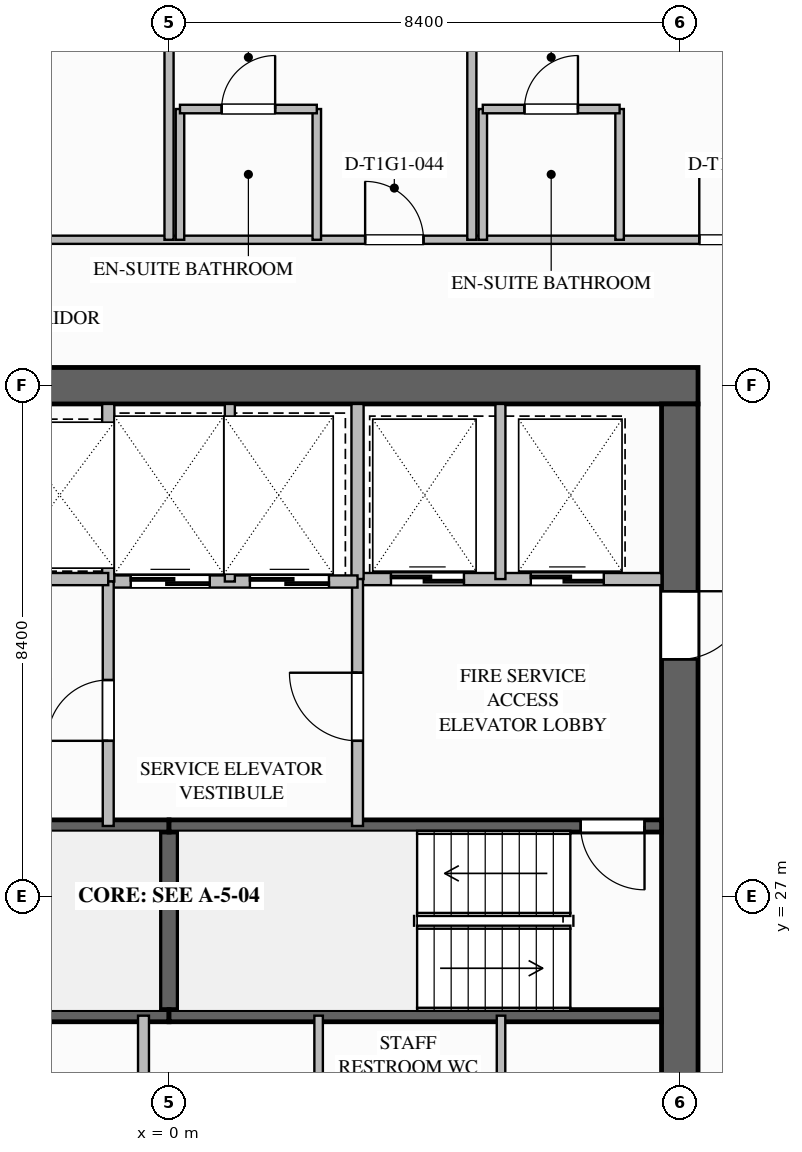
"""IFC4 building model, lengths in metres.
Left out: names, types, materials, properties, quantities, classifications, styles, units other than length and angle.
Written with IfcOpenShell. Run it as: python <this file> out.ifc"""

import sys

from ifc_helpers import new_model, si_unit, direction, frame, frame_2d, origin, place, context, subcontext, project, spatial, rectangle, extrude, element, fill, save


model = new_model("IFC4")
c1 = context("Model", 3, precision=1e-05, world=origin(), true_north=direction((0.0, 1.0)))
c2 = subcontext(c1, "Body", "Model", "MODEL_VIEW")
j1 = project(units=[si_unit("LENGTHUNIT", "METRE"), si_unit("PLANEANGLEUNIT", "RADIAN")], contexts=[c1])
p1 = place(None, origin())
s1 = spatial("IfcSite", under=j1, at=p1, CompositionType="ELEMENT")
p2 = place(p1, origin())
s2 = spatial("IfcBuilding", under=s1, at=p2, CompositionType="ELEMENT")
p3 = place(p2, frame((0.0, 0.0, 33.2)))
s3 = spatial("IfcBuildingStorey", under=s2, at=p3, CompositionType="ELEMENT", Elevation=33.2)
p4 = place(p3, frame((-8.7, 35.4, 0.0), z_axis=(0.0, 0.0, 1.0), x_axis=(1.0, 0.0, 0.0)))
e1 = element("IfcWall", 1, at=p4, inside=s3, PredefinedType="SHEAR", context=c2, shape_type="SweptSolid", body=[
    extrude(rectangle(XDim=17.4, YDim=0.6, at=frame_2d((8.7, 0.0))), origin(), (0.0, 0.0, 1.0), 3.5),
])
p5 = place(p3, frame((8.4, 35.1, 0.0), z_axis=(0.0, 0.0, 1.0), x_axis=(0.0, -1.0, 0.0)))
e2 = element("IfcWall", 2, at=p5, inside=s3, PredefinedType="SHEAR", context=c2, shape_type="SweptSolid", body=[
    extrude(rectangle(XDim=16.2, YDim=0.6, at=frame_2d((8.1, 0.0))), origin(), (0.0, 0.0, 1.0), 3.5),
])
p6 = place(p5, frame((3.08, 0.0, 0.0)))
e3 = element("IfcOpeningElement", 3, at=p6, cuts=e2, PredefinedType="OPENING", context=c2, shape_type="SweptSolid", body=[
    extrude(rectangle(XDim=1.12, YDim=2.1, at=frame_2d((0.56, 1.05))), frame((0.0, 0.31, 0.0), z_axis=(0.0, -1.0, 0.0), x_axis=(1.0, 0.0, 0.0)), (0.0, 0.0, 1.0), 0.62),
])
p7 = place(p3, frame((0.0, 25.04, 0.0), z_axis=(0.0, 0.0, 1.0), x_axis=(0.0, 1.0, 0.0)))
e4 = element("IfcWall", 4, at=p7, inside=s3, PredefinedType="SOLIDWALL", context=c2, shape_type="SweptSolid", body=[
    extrude(rectangle(XDim=3.12, YDim=0.3, at=frame_2d((1.56, 0.0))), origin(), (0.0, 0.0, 1.0), 3.24),
])
p8 = place(p3, frame((-8.1, 25.04, 0.0), z_axis=(0.0, 0.0, 1.0), x_axis=(1.0, 0.0, 0.0)))
e5 = element("IfcWall", 5, at=p8, inside=s3, PredefinedType="SOLIDWALL", context=c2, shape_type="SweptSolid", body=[
    extrude(rectangle(XDim=8.1, YDim=0.2, at=frame_2d((4.05, 0.0))), origin(), (0.0, 0.0, 1.0), 3.24),
])
p9 = place(p8, frame((0.28, 0.0, 0.0)))
e6 = element("IfcOpeningElement", 6, at=p9, cuts=e5, PredefinedType="OPENING", context=c2, shape_type="SweptSolid", body=[
    extrude(rectangle(XDim=1.05, YDim=2.1, at=frame_2d((0.525, 1.05))), frame((0.0, 0.11, 0.0), z_axis=(0.0, -1.0, 0.0), x_axis=(1.0, 0.0, 0.0)), (0.0, 0.0, 1.0), 0.22),
])
for number, where, z_axis, x_axis in (
    (7, (-8.1, 28.16, 0.0), (0.0, 0.0, 1.0), (1.0, 0.0, 0.0)),
    (8, (0.0, 25.04, 0.0), (0.0, 0.0, 1.0), (1.0, 0.0, 0.0)),
):
    element("IfcWall", number, at=place(p3, frame(where, z_axis=z_axis, x_axis=x_axis)), inside=s3, PredefinedType="SOLIDWALL", context=c2, shape_type="SweptSolid", body=[
        extrude(rectangle(XDim=8.1, YDim=0.2, at=frame_2d((4.05, 0.0))), origin(), (0.0, 0.0, 1.0), 3.24),
    ])
p10 = place(p3, frame((8.1, 28.16, 0.0), z_axis=(0.0, 0.0, 1.0), x_axis=(-1.0, 0.0, 0.0)))
e9 = element("IfcWall", 9, at=p10, inside=s3, PredefinedType="SOLIDWALL", context=c2, shape_type="SweptSolid", body=[
    extrude(rectangle(XDim=8.1, YDim=0.2, at=frame_2d((4.05, 0.0))), origin(), (0.0, 0.0, 1.0), 3.24),
])
p11 = place(p10, frame((0.28, 0.0, 0.0)))
e10 = element("IfcOpeningElement", 10, at=p11, cuts=e9, PredefinedType="OPENING", context=c2, shape_type="SweptSolid", body=[
    extrude(rectangle(XDim=1.05, YDim=2.1, at=frame_2d((0.525, 1.05))), frame((0.0, 0.11, 0.0), z_axis=(0.0, -1.0, 0.0), x_axis=(1.0, 0.0, 0.0)), (0.0, 0.0, 1.0), 0.22),
])
p12 = place(p3, frame((3.1, 32.22, 0.0), z_axis=(0.0, 0.0, 1.0), x_axis=(1.0, 0.0, 0.0)))
e11 = element("IfcWall", 11, at=p12, inside=s3, PredefinedType="SOLIDWALL", context=c2, shape_type="SweptSolid", body=[
    extrude(rectangle(XDim=5.0, YDim=0.2, at=frame_2d((2.5, 0.0))), origin(), (0.0, 0.0, 1.0), 3.24),
])
p13 = place(p12, frame((0.55, 0.0, 0.0)))
e12 = element("IfcOpeningElement", 12, at=p13, cuts=e11, PredefinedType="OPENING", context=c2, shape_type="SweptSolid", body=[
    extrude(rectangle(XDim=1.2, YDim=2.2, at=frame_2d((0.6, 1.1))), frame((0.0, 0.11, 0.0), z_axis=(0.0, -1.0, 0.0), x_axis=(1.0, 0.0, 0.0)), (0.0, 0.0, 1.0), 0.22),
])
p14 = place(p12, frame((2.85, 0.0, 0.0)))
e13 = element("IfcOpeningElement", 13, at=p14, cuts=e11, PredefinedType="OPENING", context=c2, shape_type="SweptSolid", body=[
    extrude(rectangle(XDim=1.2, YDim=2.2, at=frame_2d((0.6, 1.1))), frame((0.0, 0.11, 0.0), z_axis=(0.0, -1.0, 0.0), x_axis=(1.0, 0.0, 0.0)), (0.0, 0.0, 1.0), 0.22),
])
p15 = place(p3, frame((3.1, 32.22, 0.0), z_axis=(0.0, 0.0, 1.0), x_axis=(0.0, 1.0, 0.0)))
e14 = element("IfcWall", 14, at=p15, inside=s3, PredefinedType="SOLIDWALL", context=c2, shape_type="SweptSolid", body=[
    extrude(rectangle(XDim=2.88, YDim=0.2, at=frame_2d((1.44, 0.0))), origin(), (0.0, 0.0, 1.0), 3.24),
])
p16 = place(p3, frame((5.45, 32.22, 0.0), z_axis=(0.0, 0.0, 1.0), x_axis=(0.0, 1.0, 0.0)))
e15 = element("IfcWall", 15, at=p16, inside=s3, PredefinedType="PARTITIONING", context=c2, shape_type="SweptSolid", body=[
    extrude(rectangle(XDim=2.88, YDim=0.165, at=frame_2d((1.44, 0.0))), origin(), (0.0, 0.0, 1.0), 3.24),
])
p17 = place(p3, frame((3.1, 28.16, 0.0), z_axis=(0.0, 0.0, 1.0), x_axis=(0.0, 1.0, 0.0)))
e16 = element("IfcWall", 16, at=p17, inside=s3, PredefinedType="SOLIDWALL", context=c2, shape_type="SweptSolid", body=[
    extrude(rectangle(XDim=4.06, YDim=0.18, at=frame_2d((2.03, 0.0))), origin(), (0.0, 0.0, 1.0), 3.24),
])
p18 = place(p17, frame((1.4, 0.0, 0.0)))
e17 = element("IfcOpeningElement", 17, at=p18, cuts=e16, PredefinedType="OPENING", context=c2, shape_type="SweptSolid", body=[
    extrude(rectangle(XDim=1.12, YDim=2.1, at=frame_2d((0.56, 1.05))), frame((0.0, 0.1, 0.0), z_axis=(0.0, -1.0, 0.0), x_axis=(1.0, 0.0, 0.0)), (0.0, 0.0, 1.0), 0.2),
])
p19 = place(p3, frame((-1.0, 32.18, 0.0), z_axis=(0.0, 0.0, 1.0), x_axis=(1.0, 0.0, 0.0)))
e18 = element("IfcWall", 18, at=p19, inside=s3, PredefinedType="SOLIDWALL", context=c2, shape_type="SweptSolid", body=[
    extrude(rectangle(XDim=4.1, YDim=0.2, at=frame_2d((2.05, 0.0))), origin(), (0.0, 0.0, 1.0), 3.24),
])
p20 = place(p19, frame((0.37, 0.0, 0.0)))
e19 = element("IfcOpeningElement", 19, at=p20, cuts=e18, PredefinedType="OPENING", context=c2, shape_type="SweptSolid", body=[
    extrude(rectangle(XDim=1.3, YDim=2.2, at=frame_2d((0.65, 1.1))), frame((0.0, 0.11, 0.0), z_axis=(0.0, -1.0, 0.0), x_axis=(1.0, 0.0, 0.0)), (0.0, 0.0, 1.0), 0.22),
])
p21 = place(p19, frame((2.33, 0.0, 0.0)))
e20 = element("IfcOpeningElement", 20, at=p21, cuts=e18, PredefinedType="OPENING", context=c2, shape_type="SweptSolid", body=[
    extrude(rectangle(XDim=1.3, YDim=2.2, at=frame_2d((0.65, 1.1))), frame((0.0, 0.11, 0.0), z_axis=(0.0, -1.0, 0.0), x_axis=(1.0, 0.0, 0.0)), (0.0, 0.0, 1.0), 0.22),
])
p22 = place(p3, frame((-1.0, 32.18, 0.0), z_axis=(0.0, 0.0, 1.0), x_axis=(0.0, 1.0, 0.0)))
e21 = element("IfcWall", 21, at=p22, inside=s3, PredefinedType="SOLIDWALL", context=c2, shape_type="SweptSolid", body=[
    extrude(rectangle(XDim=2.92, YDim=0.2, at=frame_2d((1.46, 0.0))), origin(), (0.0, 0.0, 1.0), 3.24),
])
p23 = place(p3, frame((1.0, 32.18, 0.0), z_axis=(0.0, 0.0, 1.0), x_axis=(0.0, 1.0, 0.0)))
e22 = element("IfcWall", 22, at=p23, inside=s3, PredefinedType="PARTITIONING", context=c2, shape_type="SweptSolid", body=[
    extrude(rectangle(XDim=2.92, YDim=0.165, at=frame_2d((1.46, 0.0))), origin(), (0.0, 0.0, 1.0), 3.24),
])
p24 = place(p3, frame((-1.0, 28.16, 0.0), z_axis=(0.0, 0.0, 1.0), x_axis=(0.0, 1.0, 0.0)))
e23 = element("IfcWall", 23, at=p24, inside=s3, PredefinedType="SOLIDWALL", context=c2, shape_type="SweptSolid", body=[
    extrude(rectangle(XDim=4.02, YDim=0.18, at=frame_2d((2.01, 0.0))), origin(), (0.0, 0.0, 1.0), 3.24),
])
p25 = place(p24, frame((1.4, 0.0, 0.0)))
e24 = element("IfcOpeningElement", 24, at=p25, cuts=e23, PredefinedType="OPENING", context=c2, shape_type="SweptSolid", body=[
    extrude(rectangle(XDim=1.0, YDim=2.1, at=frame_2d((0.5, 1.05))), frame((0.0, 0.1, 0.0), z_axis=(0.0, -1.0, 0.0), x_axis=(1.0, 0.0, 0.0)), (0.0, 0.0, 1.0), 0.2),
])
p26 = place(p3, frame((-8.1, 32.22, 0.0), z_axis=(0.0, 0.0, 1.0), x_axis=(1.0, 0.0, 0.0)))
e25 = element("IfcWall", 25, at=p26, inside=s3, PredefinedType="SOLIDWALL", context=c2, shape_type="SweptSolid", body=[
    extrude(rectangle(XDim=7.1, YDim=0.2, at=frame_2d((3.55, 0.0))), origin(), (0.0, 0.0, 1.0), 3.24),
])
p27 = place(p3, frame((-0.42, 21.78, 0.0), z_axis=(0.0, 0.0, 1.0), x_axis=(0.0, 1.0, 0.0)))
e26 = element("IfcWall", 26, at=p27, inside=s3, PredefinedType="SOLIDWALL", context=c2, shape_type="SweptSolid", body=[
    extrude(rectangle(XDim=3.26, YDim=0.18, at=frame_2d((1.63, 0.0))), origin(), (0.0, 0.0, 1.0), 3.24),
])
p28 = place(p27, frame((1.1, 0.0, 0.0)))
e27 = element("IfcOpeningElement", 27, at=p28, cuts=e26, PredefinedType="OPENING", context=c2, shape_type="SweptSolid", body=[
    extrude(rectangle(XDim=1.0, YDim=2.1, at=frame_2d((0.5, 1.05))), frame((0.0, 0.1, 0.0), z_axis=(0.0, -1.0, 0.0), x_axis=(1.0, 0.0, 0.0)), (0.0, 0.0, 1.0), 0.2),
])
p29 = place(p3, frame((2.46, 21.78, 0.0), z_axis=(0.0, 0.0, 1.0), x_axis=(0.0, 1.0, 0.0)))
e28 = element("IfcWall", 28, at=p29, inside=s3, PredefinedType="PLUMBINGWALL", context=c2, shape_type="SweptSolid", body=[
    extrude(rectangle(XDim=3.26, YDim=0.14, at=frame_2d((1.63, 0.0))), origin(), (0.0, 0.0, 1.0), 3.24),
])
p30 = place(p29, frame((1.0, 0.0, 0.0)))
e29 = element("IfcOpeningElement", 29, at=p30, cuts=e28, PredefinedType="OPENING", context=c2, shape_type="SweptSolid", body=[
    extrude(rectangle(XDim=0.92, YDim=2.1, at=frame_2d((0.46, 1.05))), frame((0.0, 0.08, 0.0), z_axis=(0.0, -1.0, 0.0), x_axis=(1.0, 0.0, 0.0)), (0.0, 0.0, 1.0), 0.16),
])
p31 = place(p3, frame((5.46, 21.78, 0.0), z_axis=(0.0, 0.0, 1.0), x_axis=(0.0, 1.0, 0.0)))
e30 = element("IfcWall", 30, at=p31, inside=s3, PredefinedType="PLUMBINGWALL", context=c2, shape_type="SweptSolid", body=[
    extrude(rectangle(XDim=3.26, YDim=0.14, at=frame_2d((1.63, 0.0))), origin(), (0.0, 0.0, 1.0), 3.24),
])
p32 = place(p31, frame((1.0, 0.0, 0.0)))
e31 = element("IfcOpeningElement", 31, at=p32, cuts=e30, PredefinedType="OPENING", context=c2, shape_type="SweptSolid", body=[
    extrude(rectangle(XDim=0.92, YDim=2.1, at=frame_2d((0.46, 1.05))), frame((0.0, 0.08, 0.0), z_axis=(0.0, -1.0, 0.0), x_axis=(1.0, 0.0, 0.0)), (0.0, 0.0, 1.0), 0.16),
])
p33 = place(p3, frame((-16.2, 37.8, 0.0), z_axis=(0.0, 0.0, 1.0), x_axis=(1.0, 0.0, 0.0)))
e32 = element("IfcWall", 32, at=p33, inside=s3, PredefinedType="PARTITIONING", context=c2, shape_type="SweptSolid", body=[
    extrude(rectangle(XDim=32.4, YDim=0.135, at=frame_2d((16.2, 0.0))), origin(), (0.0, 0.0, 1.0), 3.24),
])
p34 = place(p33, frame((3.189, 0.0, 0.0)))
e33 = element("IfcOpeningElement", 33, at=p34, cuts=e32, PredefinedType="OPENING", context=c2, shape_type="SweptSolid", body=[
    extrude(rectangle(XDim=0.96, YDim=2.15, at=frame_2d((0.48, 1.075))), frame((0.0, 0.077, 0.0), z_axis=(0.0, -1.0, 0.0), x_axis=(1.0, 0.0, 0.0)), (0.0, 0.0, 1.0), 0.155),
])
p35 = place(p33, frame((8.229, 0.0, 0.0)))
e34 = element("IfcOpeningElement", 34, at=p35, cuts=e32, PredefinedType="OPENING", context=c2, shape_type="SweptSolid", body=[
    extrude(rectangle(XDim=1.26, YDim=2.2, at=frame_2d((0.63, 1.1))), frame((0.0, 0.077, 0.0), z_axis=(0.0, -1.0, 0.0), x_axis=(1.0, 0.0, 0.0)), (0.0, 0.0, 1.0), 0.155),
])
p36 = place(p33, frame((12.78, 0.0, 0.0)))
e35 = element("IfcOpeningElement", 35, at=p36, cuts=e32, PredefinedType="OPENING", context=c2, shape_type="SweptSolid", body=[
    extrude(rectangle(XDim=1.02, YDim=2.15, at=frame_2d((0.51, 1.075))), frame((0.0, 0.077, 0.0), z_axis=(0.0, -1.0, 0.0), x_axis=(1.0, 0.0, 0.0)), (0.0, 0.0, 1.0), 0.155),
])
p37 = place(p33, frame((19.425, 0.0, 0.0)))
e36 = element("IfcOpeningElement", 36, at=p37, cuts=e32, PredefinedType="OPENING", context=c2, shape_type="SweptSolid", body=[
    extrude(rectangle(XDim=0.96, YDim=2.15, at=frame_2d((0.48, 1.075))), frame((0.0, 0.077, 0.0), z_axis=(0.0, -1.0, 0.0), x_axis=(1.0, 0.0, 0.0)), (0.0, 0.0, 1.0), 0.155),
])
p38 = place(p33, frame((24.92, 0.0, 0.0)))
e37 = element("IfcOpeningElement", 37, at=p38, cuts=e32, PredefinedType="OPENING", context=c2, shape_type="SweptSolid", body=[
    extrude(rectangle(XDim=1.26, YDim=2.2, at=frame_2d((0.63, 1.1))), frame((0.0, 0.077, 0.0), z_axis=(0.0, -1.0, 0.0), x_axis=(1.0, 0.0, 0.0)), (0.0, 0.0, 1.0), 0.155),
])
p39 = place(p33, frame((30.68, 0.0, 0.0)))
e38 = element("IfcOpeningElement", 38, at=p39, cuts=e32, PredefinedType="OPENING", context=c2, shape_type="SweptSolid", body=[
    extrude(rectangle(XDim=0.96, YDim=2.15, at=frame_2d((0.48, 1.075))), frame((0.0, 0.077, 0.0), z_axis=(0.0, -1.0, 0.0), x_axis=(1.0, 0.0, 0.0)), (0.0, 0.0, 1.0), 0.155),
])
p40 = place(p3, frame((0.0, 37.8, 0.0), z_axis=(0.0, 0.0, 1.0), x_axis=(0.0, 1.0, 0.0)))
e39 = element("IfcWall", 39, at=p40, inside=s3, PredefinedType="PARTITIONING", context=c2, shape_type="SweptSolid", body=[
    extrude(rectangle(XDim=15.4, YDim=0.15, at=frame_2d((7.7, 0.0))), origin(), (0.0, 0.0, 1.0), 2.298),
])
p41 = place(p3, frame((0.18, 37.8, 0.0), z_axis=(0.0, 0.0, 1.0), x_axis=(0.0, 1.0, 0.0)))
e40 = element("IfcWall", 40, at=p41, inside=s3, PredefinedType="PLUMBINGWALL", context=c2, shape_type="SweptSolid", body=[
    extrude(rectangle(XDim=2.15, YDim=0.14, at=frame_2d((1.075, 0.0))), origin(), (0.0, 0.0, 1.0), 2.617),
])
p42 = place(p3, frame((2.43, 37.8, 0.0), z_axis=(0.0, 0.0, 1.0), x_axis=(0.0, 1.0, 0.0)))
e41 = element("IfcWall", 41, at=p42, inside=s3, PredefinedType="PLUMBINGWALL", context=c2, shape_type="SweptSolid", body=[
    extrude(rectangle(XDim=2.15, YDim=0.14, at=frame_2d((1.075, 0.0))), origin(), (0.0, 0.0, 1.0), 3.24),
])
p43 = place(p3, frame((0.18, 39.95, 0.0), z_axis=(0.0, 0.0, 1.0), x_axis=(1.0, 0.0, 0.0)))
e42 = element("IfcWall", 42, at=p43, inside=s3, PredefinedType="PLUMBINGWALL", context=c2, shape_type="SweptSolid", body=[
    extrude(rectangle(XDim=2.25, YDim=0.14, at=frame_2d((1.125, 0.0))), origin(), (0.0, 0.0, 1.0), 3.24),
])
p44 = place(p43, frame((0.685, 0.0, 0.0)))
e43 = element("IfcOpeningElement", 43, at=p44, cuts=e42, PredefinedType="OPENING", context=c2, shape_type="SweptSolid", body=[
    extrude(rectangle(XDim=0.88, YDim=2.1, at=frame_2d((0.44, 1.05))), frame((0.0, 0.08, 0.0), z_axis=(0.0, -1.0, 0.0), x_axis=(1.0, 0.0, 0.0)), (0.0, 0.0, 1.0), 0.16),
])
p45 = place(p3, frame((4.98, 37.8, 0.0), z_axis=(0.0, 0.0, 1.0), x_axis=(0.0, 1.0, 0.0)))
e44 = element("IfcWall", 44, at=p45, inside=s3, PredefinedType="PARTITIONING", context=c2, shape_type="SweptSolid", body=[
    extrude(rectangle(XDim=15.4, YDim=0.15, at=frame_2d((7.7, 0.0))), origin(), (0.0, 0.0, 1.0), 3.24),
])
for number, where, z_axis, x_axis in (
    (45, (5.16, 37.8, 0.0), (0.0, 0.0, 1.0), (0.0, 1.0, 0.0)),
    (46, (7.41, 37.8, 0.0), (0.0, 0.0, 1.0), (0.0, 1.0, 0.0)),
):
    element("IfcWall", number, at=place(p3, frame(where, z_axis=z_axis, x_axis=x_axis)), inside=s3, PredefinedType="PLUMBINGWALL", context=c2, shape_type="SweptSolid", body=[
        extrude(rectangle(XDim=2.15, YDim=0.14, at=frame_2d((1.075, 0.0))), origin(), (0.0, 0.0, 1.0), 3.24),
    ])
p46 = place(p3, frame((5.16, 39.95, 0.0), z_axis=(0.0, 0.0, 1.0), x_axis=(1.0, 0.0, 0.0)))
e47 = element("IfcWall", 47, at=p46, inside=s3, PredefinedType="PLUMBINGWALL", context=c2, shape_type="SweptSolid", body=[
    extrude(rectangle(XDim=2.25, YDim=0.14, at=frame_2d((1.125, 0.0))), origin(), (0.0, 0.0, 1.0), 3.24),
])
p47 = place(p46, frame((0.685, 0.0, 0.0)))
e48 = element("IfcOpeningElement", 48, at=p47, cuts=e47, PredefinedType="OPENING", context=c2, shape_type="SweptSolid", body=[
    extrude(rectangle(XDim=0.88, YDim=2.1, at=frame_2d((0.44, 1.05))), frame((0.0, 0.08, 0.0), z_axis=(0.0, -1.0, 0.0), x_axis=(1.0, 0.0, 0.0)), (0.0, 0.0, 1.0), 0.16),
])
p48 = place(p11, origin())
e49 = element("IfcDoor", 49, at=p48, inside=s3, OperationType="SINGLE_SWING_LEFT", PredefinedType="DOOR", context=c2, shape_type="SweptSolid", body=[
    extrude(rectangle(XDim=1.05, YDim=2.1, at=frame_2d((0.525, 1.05))), frame((0.0, 0.025, 0.0), z_axis=(0.0, -1.0, 0.0), x_axis=(1.0, 0.0, 0.0)), (0.0, 0.0, 1.0), 0.05),
])
fill(e10, e49)
p49 = place(p13, origin())
e50 = element("IfcDoor", 50, at=p49, inside=s3, OperationType="SLIDING_TO_LEFT", PredefinedType="DOOR", context=c2, shape_type="SweptSolid", body=[
    extrude(rectangle(XDim=1.2, YDim=2.2, at=frame_2d((0.6, 1.1))), frame((0.0, 0.025, 0.0), z_axis=(0.0, -1.0, 0.0), x_axis=(1.0, 0.0, 0.0)), (0.0, 0.0, 1.0), 0.05),
])
fill(e12, e50)
p50 = place(p14, origin())
e51 = element("IfcDoor", 51, at=p50, inside=s3, OperationType="SLIDING_TO_LEFT", PredefinedType="DOOR", context=c2, shape_type="SweptSolid", body=[
    extrude(rectangle(XDim=1.2, YDim=2.2, at=frame_2d((0.6, 1.1))), frame((0.0, 0.025, 0.0), z_axis=(0.0, -1.0, 0.0), x_axis=(1.0, 0.0, 0.0)), (0.0, 0.0, 1.0), 0.05),
])
fill(e13, e51)
p51 = place(p18, origin())
e52 = element("IfcDoor", 52, at=p51, inside=s3, OperationType="SINGLE_SWING_RIGHT", PredefinedType="DOOR", context=c2, shape_type="SweptSolid", body=[
    extrude(rectangle(XDim=1.12, YDim=2.1, at=frame_2d((0.56, 1.05))), frame((0.0, 0.025, 0.0), z_axis=(0.0, -1.0, 0.0), x_axis=(1.0, 0.0, 0.0)), (0.0, 0.0, 1.0), 0.05),
])
fill(e17, e52)
p52 = place(p6, origin())
e53 = element("IfcDoor", 53, at=p52, inside=s3, OperationType="SINGLE_SWING_LEFT", PredefinedType="DOOR", context=c2, shape_type="SweptSolid", body=[
    extrude(rectangle(XDim=1.12, YDim=2.1, at=frame_2d((0.56, 1.05))), frame((0.0, 0.025, 0.0), z_axis=(0.0, -1.0, 0.0), x_axis=(1.0, 0.0, 0.0)), (0.0, 0.0, 1.0), 0.05),
])
fill(e3, e53)
p53 = place(p20, origin())
e54 = element("IfcDoor", 54, at=p53, inside=s3, OperationType="SLIDING_TO_LEFT", PredefinedType="DOOR", context=c2, shape_type="SweptSolid", body=[
    extrude(rectangle(XDim=1.3, YDim=2.2, at=frame_2d((0.65, 1.1))), frame((0.0, 0.025, 0.0), z_axis=(0.0, -1.0, 0.0), x_axis=(1.0, 0.0, 0.0)), (0.0, 0.0, 1.0), 0.05),
])
fill(e19, e54)
p54 = place(p21, origin())
e55 = element("IfcDoor", 55, at=p54, inside=s3, OperationType="SLIDING_TO_LEFT", PredefinedType="DOOR", context=c2, shape_type="SweptSolid", body=[
    extrude(rectangle(XDim=1.3, YDim=2.2, at=frame_2d((0.65, 1.1))), frame((0.0, 0.025, 0.0), z_axis=(0.0, -1.0, 0.0), x_axis=(1.0, 0.0, 0.0)), (0.0, 0.0, 1.0), 0.05),
])
fill(e20, e55)
p55 = place(p25, origin())
e56 = element("IfcDoor", 56, at=p55, inside=s3, OperationType="SINGLE_SWING_LEFT", PredefinedType="DOOR", context=c2, shape_type="SweptSolid", body=[
    extrude(rectangle(XDim=1.0, YDim=2.1, at=frame_2d((0.5, 1.05))), frame((0.0, 0.025, 0.0), z_axis=(0.0, -1.0, 0.0), x_axis=(1.0, 0.0, 0.0)), (0.0, 0.0, 1.0), 0.05),
])
fill(e24, e56)
p56 = place(p44, origin())
e57 = element("IfcDoor", 57, at=p56, inside=s3, OperationType="SINGLE_SWING_RIGHT", PredefinedType="DOOR", context=c2, shape_type="SweptSolid", body=[
    extrude(rectangle(XDim=0.88, YDim=2.1, at=frame_2d((0.44, 1.05))), frame((0.0, 0.025, 0.0), z_axis=(0.0, -1.0, 0.0), x_axis=(1.0, 0.0, 0.0)), (0.0, 0.0, 1.0), 0.05),
])
fill(e43, e57)
p57 = place(p37, origin())
e58 = element("IfcDoor", 58, at=p57, inside=s3, OperationType="SINGLE_SWING_LEFT", PredefinedType="DOOR", context=c2, shape_type="SweptSolid", body=[
    extrude(rectangle(XDim=0.96, YDim=2.15, at=frame_2d((0.48, 1.075))), frame((0.0, 0.025, 0.0), z_axis=(0.0, -1.0, 0.0), x_axis=(1.0, 0.0, 0.0)), (0.0, 0.0, 1.0), 0.05),
])
fill(e36, e58)
p58 = place(p47, origin())
e59 = element("IfcDoor", 59, at=p58, inside=s3, OperationType="SINGLE_SWING_RIGHT", PredefinedType="DOOR", context=c2, shape_type="SweptSolid", body=[
    extrude(rectangle(XDim=0.88, YDim=2.1, at=frame_2d((0.44, 1.05))), frame((0.0, 0.025, 0.0), z_axis=(0.0, -1.0, 0.0), x_axis=(1.0, 0.0, 0.0)), (0.0, 0.0, 1.0), 0.05),
])
fill(e48, e59)
p59 = place(p38, origin())
e60 = element("IfcDoor", 60, at=p59, inside=s3, OperationType="SINGLE_SWING_LEFT", PredefinedType="DOOR", context=c2, shape_type="SweptSolid", body=[
    extrude(rectangle(XDim=1.26, YDim=2.2, at=frame_2d((0.63, 1.1))), frame((0.0, 0.025, 0.0), z_axis=(0.0, -1.0, 0.0), x_axis=(1.0, 0.0, 0.0)), (0.0, 0.0, 1.0), 0.05),
])
fill(e37, e60)
save(model, sys.argv[1])
